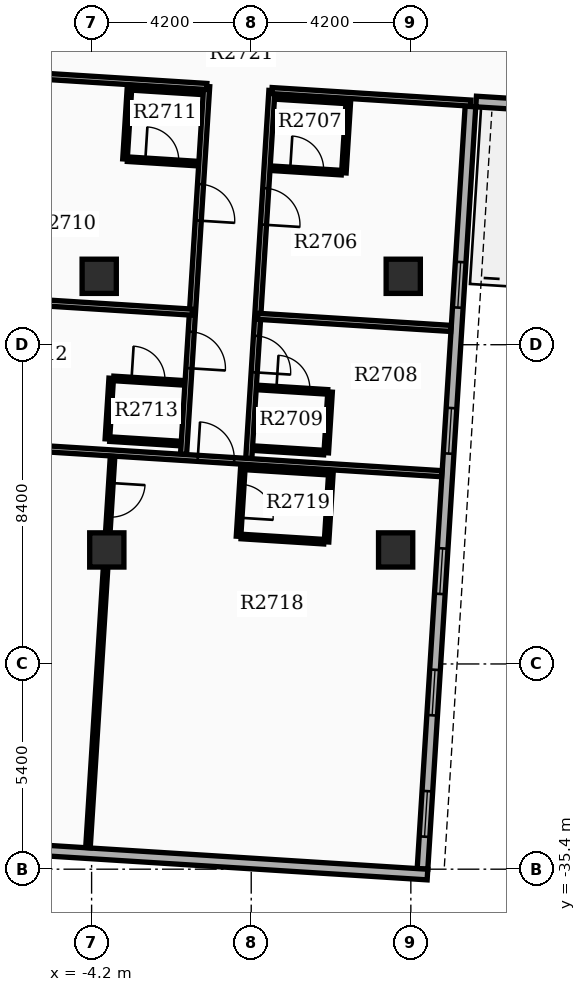
"""IFC4 building model, lengths in metres.
Left out: names, types, materials, properties, quantities, classifications, styles, units other than length and angle.
Written with IfcOpenShell. Run it as: python <this file> out.ifc"""

import sys

from ifc_helpers import new_model, si_unit, direction, frame, frame_2d, origin, origin_2d, place, context, subcontext, project, spatial, rectangle, extrude, element, fill, save


model = new_model("IFC4")
c1 = context("Model", 3, precision=1e-05, world=origin(), true_north=direction((0.0, 1.0)))
c2 = subcontext(c1, "Body", "Model", "MODEL_VIEW")
j1 = project(units=[si_unit("LENGTHUNIT", "METRE"), si_unit("PLANEANGLEUNIT", "RADIAN")], contexts=[c1])
p1 = place(None, origin())
s1 = spatial("IfcSite", under=j1, at=p1, CompositionType="ELEMENT")
p2 = place(p1, origin())
s2 = spatial("IfcBuilding", under=s1, at=p2, CompositionType="ELEMENT")
p3 = place(p2, frame((0.0, 0.0, 168.3)))
s3 = spatial("IfcBuildingStorey", under=s2, at=p3, CompositionType="ELEMENT", Elevation=168.3)
for number, where, z_axis, x_axis in (
    (1, (-4.0, -19.8, 0.0), (0.0, 0.0, 1.0), (1.0, 0.0, 0.0)),
    (2, (4.0, -19.8, 0.0), (0.0, 0.0, 1.0), (1.0, 0.0, 0.0)),
    (3, (-3.8, -27.0, 0.0), (0.0, 0.0, 1.0), (1.0, 0.0, 0.0)),
    (4, (3.8, -27.0, 0.0), (0.0, 0.0, 1.0), (1.0, 0.0, 0.0)),
):
    element("IfcColumn", number, at=place(p3, frame(where, z_axis=z_axis, x_axis=x_axis)), inside=s3, PredefinedType="COLUMN", context=c2, shape_type="SweptSolid", body=[
        extrude(rectangle(XDim=0.9, YDim=0.9, at=origin_2d()), origin(), (0.0, 0.0, 1.0), 3.9),
    ])
p4 = place(p3, frame((4.507, -35.393, 0.0), z_axis=(0.0, 0.0, 1.0), x_axis=(0.062784355807, 0.998027116198, 0.0)))
e5 = element("IfcWall", 5, at=p4, inside=s3, PredefinedType="STANDARD", context=c2, shape_type="SweptSolid", body=[
    extrude(rectangle(XDim=20.1, YDim=0.28, at=frame_2d((10.05, 0.0))), origin(), (0.0, 0.0, 1.0), 2.97),
])
p5 = place(p4, frame((0.85, 0.0, 0.8)))
e6 = element("IfcOpeningElement", 6, at=p5, cuts=e5, PredefinedType="OPENING", context=c2, shape_type="SweptSolid", body=[
    extrude(rectangle(XDim=1.2, YDim=1.6, at=frame_2d((0.6, 0.8))), frame((0.0, 0.15, 0.0), z_axis=(0.0, -1.0, 0.0), x_axis=(1.0, 0.0, 0.0)), (0.0, 0.0, 1.0), 0.3),
])
p6 = place(p4, frame((4.05, 0.0, 0.8)))
e7 = element("IfcOpeningElement", 7, at=p6, cuts=e5, PredefinedType="OPENING", context=c2, shape_type="SweptSolid", body=[
    extrude(rectangle(XDim=1.2, YDim=1.6, at=frame_2d((0.6, 0.8))), frame((0.0, 0.15, 0.0), z_axis=(0.0, -1.0, 0.0), x_axis=(1.0, 0.0, 0.0)), (0.0, 0.0, 1.0), 0.3),
])
p7 = place(p4, frame((7.25, 0.0, 0.8)))
e8 = element("IfcOpeningElement", 8, at=p7, cuts=e5, PredefinedType="OPENING", context=c2, shape_type="SweptSolid", body=[
    extrude(rectangle(XDim=1.2, YDim=1.6, at=frame_2d((0.6, 0.8))), frame((0.0, 0.15, 0.0), z_axis=(0.0, -1.0, 0.0), x_axis=(1.0, 0.0, 0.0)), (0.0, 0.0, 1.0), 0.3),
])
p8 = place(p4, frame((10.95, 0.0, 0.8)))
e9 = element("IfcOpeningElement", 9, at=p8, cuts=e5, PredefinedType="OPENING", context=c2, shape_type="SweptSolid", body=[
    extrude(rectangle(XDim=1.2, YDim=1.6, at=frame_2d((0.6, 0.8))), frame((0.0, 0.15, 0.0), z_axis=(0.0, -1.0, 0.0), x_axis=(1.0, 0.0, 0.0)), (0.0, 0.0, 1.0), 0.3),
])
p9 = place(p4, frame((14.799, 0.0, 0.85)))
e10 = element("IfcOpeningElement", 10, at=p9, cuts=e5, PredefinedType="OPENING", context=c2, shape_type="SweptSolid", body=[
    extrude(rectangle(XDim=1.2, YDim=1.6, at=frame_2d((0.6, 0.8))), frame((0.0, 0.15, 0.0), z_axis=(0.0, -1.0, 0.0), x_axis=(1.0, 0.0, 0.0)), (0.0, 0.0, 1.0), 0.3),
])
p10 = place(p3, frame((-9.055, -34.68, 0.0), z_axis=(0.0, 0.0, 1.0), x_axis=(0.998026318072, -0.062797041623, 0.0)))
e11 = element("IfcWall", 11, at=p10, inside=s3, PredefinedType="STANDARD", context=c2, shape_type="SweptSolid", body=[
    extrude(rectangle(XDim=13.72, YDim=0.28, at=frame_2d((6.86, 0.0))), origin(), (0.0, 0.0, 1.0), 2.97),
])
p11 = place(p10, frame((0.85, 0.0, 0.85)))
e12 = element("IfcOpeningElement", 12, at=p11, cuts=e11, PredefinedType="OPENING", context=c2, shape_type="SweptSolid", body=[
    extrude(rectangle(XDim=1.0, YDim=1.5, at=frame_2d((0.5, 0.75))), frame((0.0, 0.15, 0.0), z_axis=(0.0, -1.0, 0.0), x_axis=(1.0, 0.0, 0.0)), (0.0, 0.0, 1.0), 0.3),
])
p12 = place(p3, frame((12.205, -15.597, 0.0), z_axis=(0.0, 0.0, 1.0), x_axis=(-0.998024885752, 0.062819801181, 0.0)))
e13 = element("IfcWall", 13, at=p12, inside=s3, PredefinedType="STANDARD", context=c2, shape_type="SweptSolid", body=[
    extrude(rectangle(XDim=6.3, YDim=0.28, at=frame_2d((3.15, 0.0))), origin(), (0.0, 0.0, 1.0), 2.97),
])
p13 = place(p3, frame((0.545, -14.914, 0.0), z_axis=(0.0, 0.0, 1.0), x_axis=(-0.062796654085, -0.998026342456, 0.0)))
e14 = element("IfcWall", 14, at=p13, inside=s3, PredefinedType="PARTITIONING", context=c2, shape_type="SweptSolid", body=[
    extrude(rectangle(XDim=9.7, YDim=0.16, at=frame_2d((4.85, 0.0))), origin(), (0.0, 0.0, 1.0), 2.96),
])
p14 = place(p13, frame((2.575, 0.0, 0.0)))
e15 = element("IfcOpeningElement", 15, at=p14, cuts=e14, PredefinedType="OPENING", context=c2, shape_type="SweptSolid", body=[
    extrude(rectangle(XDim=0.96, YDim=2.15, at=frame_2d((0.48, 1.075))), frame((0.0, 0.09, 0.0), z_axis=(0.0, -1.0, 0.0), x_axis=(1.0, 0.0, 0.0)), (0.0, 0.0, 1.0), 0.18),
])
p15 = place(p13, frame((6.467, 0.0, 0.0)))
e16 = element("IfcOpeningElement", 16, at=p15, cuts=e14, PredefinedType="OPENING", context=c2, shape_type="SweptSolid", body=[
    extrude(rectangle(XDim=0.96, YDim=2.15, at=frame_2d((0.48, 1.075))), frame((0.0, 0.09, 0.0), z_axis=(0.0, -1.0, 0.0), x_axis=(1.0, 0.0, 0.0)), (0.0, 0.0, 1.0), 0.18),
])
p16 = place(p3, frame((0.545, -14.914, 0.0), z_axis=(0.0, 0.0, 1.0), x_axis=(0.998025838074, -0.062804669704, 0.0)))
e17 = element("IfcWall", 17, at=p16, inside=s3, PredefinedType="PARTITIONING", context=c2, shape_type="SweptSolid", body=[
    extrude(rectangle(XDim=5.24, YDim=0.16, at=frame_2d((2.62, 0.0))), origin(), (0.0, 0.0, 1.0), 2.96),
])
p17 = place(p3, frame((0.171, -20.852, 0.0), z_axis=(0.0, 0.0, 1.0), x_axis=(0.998025621735, -0.06280810744, 0.0)))
e18 = element("IfcWall", 18, at=p17, inside=s3, PredefinedType="PARTITIONING", context=c2, shape_type="SweptSolid", body=[
    extrude(rectangle(XDim=5.092, YDim=0.16, at=frame_2d((2.546, 0.0))), origin(), (0.0, 0.0, 1.0), 2.96),
])
p18 = place(p3, frame((0.556, -16.958, 0.0), z_axis=(0.0, 0.0, 1.0), x_axis=(0.998027443946, -0.062779145668, 0.0)))
e19 = element("IfcWall", 19, at=p18, inside=s3, PredefinedType="PARTITIONING", context=c2, shape_type="SweptSolid", body=[
    extrude(rectangle(XDim=1.82, YDim=0.12, at=frame_2d((0.91, 0.0))), origin(), (0.0, 0.0, 1.0), 2.96),
])
p19 = place(p18, frame((0.47, 0.0, 0.0)))
e20 = element("IfcOpeningElement", 20, at=p19, cuts=e19, PredefinedType="OPENING", context=c2, shape_type="SweptSolid", body=[
    extrude(rectangle(XDim=0.88, YDim=2.1, at=frame_2d((0.44, 1.05))), frame((0.0, 0.07, 0.0), z_axis=(0.0, -1.0, 0.0), x_axis=(1.0, 0.0, 0.0)), (0.0, 0.0, 1.0), 0.14),
])
p20 = place(p3, frame((0.674, -15.082, 0.0), z_axis=(0.0, 0.0, 1.0), x_axis=(0.998027443946, -0.062779145668, 0.0)))
e21 = element("IfcWall", 21, at=p20, inside=s3, PredefinedType="PARTITIONING", context=c2, shape_type="SweptSolid", body=[
    extrude(rectangle(XDim=1.82, YDim=0.12, at=frame_2d((0.91, 0.0))), origin(), (0.0, 0.0, 1.0), 2.96),
])
p21 = place(p3, frame((2.556, -15.2, 0.0), z_axis=(0.0, 0.0, 1.0), x_axis=(-0.062847152131, -0.998023163794, 0.0)))
e22 = element("IfcWall", 22, at=p21, inside=s3, PredefinedType="PARTITIONING", context=c2, shape_type="SweptSolid", body=[
    extrude(rectangle(XDim=1.88, YDim=0.12, at=frame_2d((0.94, 0.0))), origin(), (0.0, 0.0, 1.0), 2.96),
])
p22 = place(p3, frame((0.193, -22.727, 0.0), z_axis=(0.0, 0.0, 1.0), x_axis=(0.998027443946, -0.062779145668, 0.0)))
e23 = element("IfcWall", 23, at=p22, inside=s3, PredefinedType="PARTITIONING", context=c2, shape_type="SweptSolid", body=[
    extrude(rectangle(XDim=1.82, YDim=0.12, at=frame_2d((0.91, 0.0))), origin(), (0.0, 0.0, 1.0), 2.96),
])
p23 = place(p22, frame((0.47, 0.0, 0.0)))
e24 = element("IfcOpeningElement", 24, at=p23, cuts=e23, PredefinedType="OPENING", context=c2, shape_type="SweptSolid", body=[
    extrude(rectangle(XDim=0.88, YDim=2.1, at=frame_2d((0.44, 1.05))), frame((0.0, 0.07, 0.0), z_axis=(0.0, -1.0, 0.0), x_axis=(1.0, 0.0, 0.0)), (0.0, 0.0, 1.0), 0.14),
])
p24 = place(p3, frame((0.093, -24.324, 0.0), z_axis=(0.0, 0.0, 1.0), x_axis=(0.998026915151, -0.062787551592, 0.0)))
e25 = element("IfcWall", 25, at=p24, inside=s3, PredefinedType="PARTITIONING", context=c2, shape_type="SweptSolid", body=[
    extrude(rectangle(XDim=1.82, YDim=0.12, at=frame_2d((0.91, 0.0))), origin(), (0.0, 0.0, 1.0), 2.96),
])
p25 = place(p3, frame((2.075, -22.845, 0.0), z_axis=(0.0, 0.0, 1.0), x_axis=(-0.062862733403, -0.998022182494, 0.0)))
e26 = element("IfcWall", 26, at=p25, inside=s3, PredefinedType="PARTITIONING", context=c2, shape_type="SweptSolid", body=[
    extrude(rectangle(XDim=1.6, YDim=0.12, at=frame_2d((0.8, 0.0))), origin(), (0.0, 0.0, 1.0), 2.96),
])
p26 = place(p3, frame((-1.172, -14.806, 0.0), z_axis=(0.0, 0.0, 1.0), x_axis=(-0.062771584278, -0.998027919553, 0.0)))
e27 = element("IfcWall", 27, at=p26, inside=s3, PredefinedType="PARTITIONING", context=c2, shape_type="SweptSolid", body=[
    extrude(rectangle(XDim=9.7, YDim=0.16, at=frame_2d((4.85, 0.0))), origin(), (0.0, 0.0, 1.0), 2.96),
])
p27 = place(p26, frame((2.575, 0.0, 0.0)))
e28 = element("IfcOpeningElement", 28, at=p27, cuts=e27, PredefinedType="OPENING", context=c2, shape_type="SweptSolid", body=[
    extrude(rectangle(XDim=0.96, YDim=2.15, at=frame_2d((0.48, 1.075))), frame((0.0, 0.09, 0.0), z_axis=(0.0, -1.0, 0.0), x_axis=(1.0, 0.0, 0.0)), (0.0, 0.0, 1.0), 0.18),
])
p28 = place(p26, frame((6.467, 0.0, 0.0)))
e29 = element("IfcOpeningElement", 29, at=p28, cuts=e27, PredefinedType="OPENING", context=c2, shape_type="SweptSolid", body=[
    extrude(rectangle(XDim=0.96, YDim=2.15, at=frame_2d((0.48, 1.075))), frame((0.0, 0.09, 0.0), z_axis=(0.0, -1.0, 0.0), x_axis=(1.0, 0.0, 0.0)), (0.0, 0.0, 1.0), 0.18),
])
p29 = place(p3, frame((-1.172, -14.806, 0.0), z_axis=(0.0, 0.0, 1.0), x_axis=(-0.998025657815, 0.06280753413, 0.0)))
e30 = element("IfcWall", 30, at=p29, inside=s3, PredefinedType="PARTITIONING", context=c2, shape_type="SweptSolid", body=[
    extrude(rectangle(XDim=6.48, YDim=0.16, at=frame_2d((3.24, 0.0))), origin(), (0.0, 0.0, 1.0), 2.96),
])
p30 = place(p3, frame((-1.546, -20.744, 0.0), z_axis=(0.0, 0.0, 1.0), x_axis=(-0.998025479614, 0.06281036572, 0.0)))
e31 = element("IfcWall", 31, at=p30, inside=s3, PredefinedType="PARTITIONING", context=c2, shape_type="SweptSolid", body=[
    extrude(rectangle(XDim=6.332, YDim=0.16, at=frame_2d((3.166, 0.0))), origin(), (0.0, 0.0, 1.0), 2.96),
])
p31 = place(p3, frame((-3.256, -16.719, 0.0), z_axis=(0.0, 0.0, 1.0), x_axis=(0.998027443946, -0.062779145668, 0.0)))
e32 = element("IfcWall", 32, at=p31, inside=s3, PredefinedType="PARTITIONING", context=c2, shape_type="SweptSolid", body=[
    extrude(rectangle(XDim=1.82, YDim=0.12, at=frame_2d((0.91, 0.0))), origin(), (0.0, 0.0, 1.0), 2.96),
])
p32 = place(p31, frame((0.47, 0.0, 0.0)))
e33 = element("IfcOpeningElement", 33, at=p32, cuts=e32, PredefinedType="OPENING", context=c2, shape_type="SweptSolid", body=[
    extrude(rectangle(XDim=0.88, YDim=2.1, at=frame_2d((0.44, 1.05))), frame((0.0, 0.07, 0.0), z_axis=(0.0, -1.0, 0.0), x_axis=(1.0, 0.0, 0.0)), (0.0, 0.0, 1.0), 0.14),
])
p33 = place(p3, frame((-3.138, -14.842, 0.0), z_axis=(0.0, 0.0, 1.0), x_axis=(0.998027443946, -0.062779145668, 0.0)))
e34 = element("IfcWall", 34, at=p33, inside=s3, PredefinedType="PARTITIONING", context=c2, shape_type="SweptSolid", body=[
    extrude(rectangle(XDim=1.82, YDim=0.12, at=frame_2d((0.91, 0.0))), origin(), (0.0, 0.0, 1.0), 2.96),
])
p34 = place(p3, frame((-3.203, -14.838, 0.0), z_axis=(0.0, 0.0, 1.0), x_axis=(-0.062847152131, -0.998023163794, 0.0)))
e35 = element("IfcWall", 35, at=p34, inside=s3, PredefinedType="PARTITIONING", context=c2, shape_type="SweptSolid", body=[
    extrude(rectangle(XDim=1.88, YDim=0.12, at=frame_2d((0.94, 0.0))), origin(), (0.0, 0.0, 1.0), 2.96),
])
p35 = place(p3, frame((-3.619, -22.487, 0.0), z_axis=(0.0, 0.0, 1.0), x_axis=(0.998027443946, -0.062779145668, 0.0)))
e36 = element("IfcWall", 36, at=p35, inside=s3, PredefinedType="PARTITIONING", context=c2, shape_type="SweptSolid", body=[
    extrude(rectangle(XDim=1.82, YDim=0.12, at=frame_2d((0.91, 0.0))), origin(), (0.0, 0.0, 1.0), 2.96),
])
p36 = place(p35, frame((0.47, 0.0, 0.0)))
e37 = element("IfcOpeningElement", 37, at=p36, cuts=e36, PredefinedType="OPENING", context=c2, shape_type="SweptSolid", body=[
    extrude(rectangle(XDim=0.88, YDim=2.1, at=frame_2d((0.44, 1.05))), frame((0.0, 0.07, 0.0), z_axis=(0.0, -1.0, 0.0), x_axis=(1.0, 0.0, 0.0)), (0.0, 0.0, 1.0), 0.14),
])
p37 = place(p3, frame((-3.719, -24.084, 0.0), z_axis=(0.0, 0.0, 1.0), x_axis=(0.998026915151, -0.062787551592, 0.0)))
e38 = element("IfcWall", 38, at=p37, inside=s3, PredefinedType="PARTITIONING", context=c2, shape_type="SweptSolid", body=[
    extrude(rectangle(XDim=1.82, YDim=0.12, at=frame_2d((0.91, 0.0))), origin(), (0.0, 0.0, 1.0), 2.96),
])
p38 = place(p3, frame((-3.684, -22.483, 0.0), z_axis=(0.0, 0.0, 1.0), x_axis=(-0.06271075472, -0.998031743605, 0.0)))
e39 = element("IfcWall", 39, at=p38, inside=s3, PredefinedType="PARTITIONING", context=c2, shape_type="SweptSolid", body=[
    extrude(rectangle(XDim=1.6, YDim=0.12, at=frame_2d((0.8, 0.0))), origin(), (0.0, 0.0, 1.0), 2.96),
])
p39 = place(p3, frame((-8.105, -24.169, 0.0), z_axis=(0.0, 0.0, 1.0), x_axis=(0.998026109115, -0.062800362452, 0.0)))
e40 = element("IfcWall", 40, at=p39, inside=s3, PredefinedType="PARTITIONING", context=c2, shape_type="SweptSolid", body=[
    extrude(rectangle(XDim=13.144, YDim=0.16, at=frame_2d((6.572, 0.0))), origin(), (0.0, 0.0, 1.0), 2.96),
])
p40 = place(p39, frame((6.712, 0.0, 0.0)))
e41 = element("IfcOpeningElement", 41, at=p40, cuts=e40, PredefinedType="OPENING", context=c2, shape_type="SweptSolid", body=[
    extrude(rectangle(XDim=0.96, YDim=2.15, at=frame_2d((0.48, 1.075))), frame((0.0, 0.09, 0.0), z_axis=(0.0, -1.0, 0.0), x_axis=(1.0, 0.0, 0.0)), (0.0, 0.0, 1.0), 0.18),
])
p41 = place(p3, frame((-3.648, -24.539, 0.0), z_axis=(0.0, 0.0, 1.0), x_axis=(-0.062786562543, -0.998026977373, 0.0)))
e42 = element("IfcWall", 42, at=p41, inside=s3, PredefinedType="PARTITIONING", context=c2, shape_type="SweptSolid", body=[
    extrude(rectangle(XDim=10.312, YDim=0.12, at=frame_2d((5.156, 0.0))), origin(), (0.0, 0.0, 1.0), 2.96),
])
p42 = place(p41, frame((0.7, 0.0, 0.0)))
e43 = element("IfcOpeningElement", 43, at=p42, cuts=e42, PredefinedType="OPENING", context=c2, shape_type="SweptSolid", body=[
    extrude(rectangle(XDim=0.9, YDim=2.1, at=frame_2d((0.45, 1.05))), frame((0.0, 0.07, 0.0), z_axis=(0.0, -1.0, 0.0), x_axis=(1.0, 0.0, 0.0)), (0.0, 0.0, 1.0), 0.14),
])
p43 = place(p3, frame((-0.219, -24.825, 0.0), z_axis=(0.0, 0.0, 1.0), x_axis=(-0.062779145668, -0.998027443946, 0.0)))
e44 = element("IfcWall", 44, at=p43, inside=s3, PredefinedType="PARTITIONING", context=c2, shape_type="SweptSolid", body=[
    extrude(rectangle(XDim=1.82, YDim=0.12, at=frame_2d((0.91, 0.0))), origin(), (0.0, 0.0, 1.0), 2.96),
])
p44 = place(p43, frame((0.45, 0.0, 0.0)))
e45 = element("IfcOpeningElement", 45, at=p44, cuts=e44, PredefinedType="OPENING", context=c2, shape_type="SweptSolid", body=[
    extrude(rectangle(XDim=0.88, YDim=2.1, at=frame_2d((0.44, 1.05))), frame((0.0, 0.07, 0.0), z_axis=(0.0, -1.0, 0.0), x_axis=(1.0, 0.0, 0.0)), (0.0, 0.0, 1.0), 0.14),
])
p45 = place(p3, frame((2.096, -24.971, 0.0), z_axis=(0.0, 0.0, 1.0), x_axis=(-0.062779145668, -0.998027443946, 0.0)))
e46 = element("IfcWall", 46, at=p45, inside=s3, PredefinedType="PARTITIONING", context=c2, shape_type="SweptSolid", body=[
    extrude(rectangle(XDim=1.82, YDim=0.12, at=frame_2d((0.91, 0.0))), origin(), (0.0, 0.0, 1.0), 2.96),
])
for number, where, z_axis, x_axis in (
    (47, (-0.149, -24.83, 0.0), (0.0, 0.0, 1.0), (0.998, -0.063, 0.0)),
    (48, (-0.264, -26.646, 0.0), (0.0, 0.0, 1.0), (0.998, -0.063, 0.0)),
):
    element("IfcWall", number, at=place(p3, frame(where, z_axis=z_axis, x_axis=x_axis)), inside=s3, PredefinedType="PARTITIONING", context=c2, shape_type="SweptSolid", body=[
        extrude(rectangle(XDim=2.18, YDim=0.12, at=frame_2d((1.09, 0.0))), origin(), (0.0, 0.0, 1.0), 2.96),
    ])
p46 = place(p5, origin())
e49 = element("IfcWindow", 49, at=p46, inside=s3, PartitioningType="SINGLE_PANEL", PredefinedType="WINDOW", context=c2, shape_type="SweptSolid", body=[
    extrude(rectangle(XDim=1.2, YDim=1.6, at=frame_2d((0.6, 0.8))), frame((0.0, 0.03, 0.0), z_axis=(0.0, -1.0, 0.0), x_axis=(1.0, 0.0, 0.0)), (0.0, 0.0, 1.0), 0.06),
])
fill(e6, e49)
p47 = place(p6, origin())
e50 = element("IfcWindow", 50, at=p47, inside=s3, PartitioningType="SINGLE_PANEL", PredefinedType="WINDOW", context=c2, shape_type="SweptSolid", body=[
    extrude(rectangle(XDim=1.2, YDim=1.6, at=frame_2d((0.6, 0.8))), frame((0.0, 0.03, 0.0), z_axis=(0.0, -1.0, 0.0), x_axis=(1.0, 0.0, 0.0)), (0.0, 0.0, 1.0), 0.06),
])
fill(e7, e50)
p48 = place(p7, origin())
e51 = element("IfcWindow", 51, at=p48, inside=s3, PartitioningType="SINGLE_PANEL", PredefinedType="WINDOW", context=c2, shape_type="SweptSolid", body=[
    extrude(rectangle(XDim=1.2, YDim=1.6, at=frame_2d((0.6, 0.8))), frame((0.0, 0.03, 0.0), z_axis=(0.0, -1.0, 0.0), x_axis=(1.0, 0.0, 0.0)), (0.0, 0.0, 1.0), 0.06),
])
fill(e8, e51)
p49 = place(p8, origin())
e52 = element("IfcWindow", 52, at=p49, inside=s3, PartitioningType="SINGLE_PANEL", PredefinedType="WINDOW", context=c2, shape_type="SweptSolid", body=[
    extrude(rectangle(XDim=1.2, YDim=1.6, at=frame_2d((0.6, 0.8))), frame((0.0, 0.03, 0.0), z_axis=(0.0, -1.0, 0.0), x_axis=(1.0, 0.0, 0.0)), (0.0, 0.0, 1.0), 0.06),
])
fill(e9, e52)
p50 = place(p9, origin())
e53 = element("IfcWindow", 53, at=p50, inside=s3, PartitioningType="SINGLE_PANEL", PredefinedType="WINDOW", context=c2, shape_type="SweptSolid", body=[
    extrude(rectangle(XDim=1.2, YDim=1.6, at=frame_2d((0.6, 0.8))), frame((0.0, 0.03, 0.0), z_axis=(0.0, -1.0, 0.0), x_axis=(1.0, 0.0, 0.0)), (0.0, 0.0, 1.0), 0.06),
])
fill(e10, e53)
p51 = place(p14, origin())
e54 = element("IfcDoor", 54, at=p51, inside=s3, OperationType="SINGLE_SWING_RIGHT", PredefinedType="DOOR", context=c2, shape_type="SweptSolid", body=[
    extrude(rectangle(XDim=0.96, YDim=2.15, at=frame_2d((0.48, 1.075))), frame((0.0, 0.025, 0.0), z_axis=(0.0, -1.0, 0.0), x_axis=(1.0, 0.0, 0.0)), (0.0, 0.0, 1.0), 0.05),
])
fill(e15, e54)
p52 = place(p19, origin())
e55 = element("IfcDoor", 55, at=p52, inside=s3, OperationType="SINGLE_SWING_LEFT", PredefinedType="DOOR", context=c2, shape_type="SweptSolid", body=[
    extrude(rectangle(XDim=0.88, YDim=2.1, at=frame_2d((0.44, 1.05))), frame((0.0, 0.025, 0.0), z_axis=(0.0, -1.0, 0.0), x_axis=(1.0, 0.0, 0.0)), (0.0, 0.0, 1.0), 0.05),
])
fill(e20, e55)
p53 = place(p15, origin())
e56 = element("IfcDoor", 56, at=p53, inside=s3, OperationType="SINGLE_SWING_RIGHT", PredefinedType="DOOR", context=c2, shape_type="SweptSolid", body=[
    extrude(rectangle(XDim=0.96, YDim=2.15, at=frame_2d((0.48, 1.075))), frame((0.0, 0.025, 0.0), z_axis=(0.0, -1.0, 0.0), x_axis=(1.0, 0.0, 0.0)), (0.0, 0.0, 1.0), 0.05),
])
fill(e16, e56)
p54 = place(p23, origin())
e57 = element("IfcDoor", 57, at=p54, inside=s3, OperationType="SINGLE_SWING_LEFT", PredefinedType="DOOR", context=c2, shape_type="SweptSolid", body=[
    extrude(rectangle(XDim=0.88, YDim=2.1, at=frame_2d((0.44, 1.05))), frame((0.0, 0.025, 0.0), z_axis=(0.0, -1.0, 0.0), x_axis=(1.0, 0.0, 0.0)), (0.0, 0.0, 1.0), 0.05),
])
fill(e24, e57)
p55 = place(p27, origin())
e58 = element("IfcDoor", 58, at=p55, inside=s3, OperationType="SINGLE_SWING_RIGHT", PredefinedType="DOOR", context=c2, shape_type="SweptSolid", body=[
    extrude(rectangle(XDim=0.96, YDim=2.15, at=frame_2d((0.48, 1.075))), frame((0.0, 0.025, 0.0), z_axis=(0.0, -1.0, 0.0), x_axis=(1.0, 0.0, 0.0)), (0.0, 0.0, 1.0), 0.05),
])
fill(e28, e58)
p56 = place(p32, origin())
e59 = element("IfcDoor", 59, at=p56, inside=s3, OperationType="SINGLE_SWING_LEFT", PredefinedType="DOOR", context=c2, shape_type="SweptSolid", body=[
    extrude(rectangle(XDim=0.88, YDim=2.1, at=frame_2d((0.44, 1.05))), frame((0.0, 0.025, 0.0), z_axis=(0.0, -1.0, 0.0), x_axis=(1.0, 0.0, 0.0)), (0.0, 0.0, 1.0), 0.05),
])
fill(e33, e59)
p57 = place(p28, origin())
e60 = element("IfcDoor", 60, at=p57, inside=s3, OperationType="SINGLE_SWING_RIGHT", PredefinedType="DOOR", context=c2, shape_type="SweptSolid", body=[
    extrude(rectangle(XDim=0.96, YDim=2.15, at=frame_2d((0.48, 1.075))), frame((0.0, 0.025, 0.0), z_axis=(0.0, -1.0, 0.0), x_axis=(1.0, 0.0, 0.0)), (0.0, 0.0, 1.0), 0.05),
])
fill(e29, e60)
p58 = place(p36, origin())
e61 = element("IfcDoor", 61, at=p58, inside=s3, OperationType="SINGLE_SWING_LEFT", PredefinedType="DOOR", context=c2, shape_type="SweptSolid", body=[
    extrude(rectangle(XDim=0.88, YDim=2.1, at=frame_2d((0.44, 1.05))), frame((0.0, 0.025, 0.0), z_axis=(0.0, -1.0, 0.0), x_axis=(1.0, 0.0, 0.0)), (0.0, 0.0, 1.0), 0.05),
])
fill(e37, e61)
p59 = place(p40, origin())
e62 = element("IfcDoor", 62, at=p59, inside=s3, OperationType="SINGLE_SWING_LEFT", PredefinedType="DOOR", context=c2, shape_type="SweptSolid", body=[
    extrude(rectangle(XDim=0.96, YDim=2.15, at=frame_2d((0.48, 1.075))), frame((0.0, 0.025, 0.0), z_axis=(0.0, -1.0, 0.0), x_axis=(1.0, 0.0, 0.0)), (0.0, 0.0, 1.0), 0.05),
])
fill(e41, e62)
p60 = place(p42, origin())
e63 = element("IfcDoor", 63, at=p60, inside=s3, OperationType="SINGLE_SWING_LEFT", PredefinedType="DOOR", context=c2, shape_type="SweptSolid", body=[
    extrude(rectangle(XDim=0.9, YDim=2.1, at=frame_2d((0.45, 1.05))), frame((0.0, 0.025, 0.0), z_axis=(0.0, -1.0, 0.0), x_axis=(1.0, 0.0, 0.0)), (0.0, 0.0, 1.0), 0.05),
])
fill(e43, e63)
p61 = place(p44, origin())
e64 = element("IfcDoor", 64, at=p61, inside=s3, OperationType="SINGLE_SWING_RIGHT", PredefinedType="DOOR", context=c2, shape_type="SweptSolid", body=[
    extrude(rectangle(XDim=0.88, YDim=2.1, at=frame_2d((0.44, 1.05))), frame((0.0, 0.025, 0.0), z_axis=(0.0, -1.0, 0.0), x_axis=(1.0, 0.0, 0.0)), (0.0, 0.0, 1.0), 0.05),
])
fill(e45, e64)
save(model, sys.argv[1])
